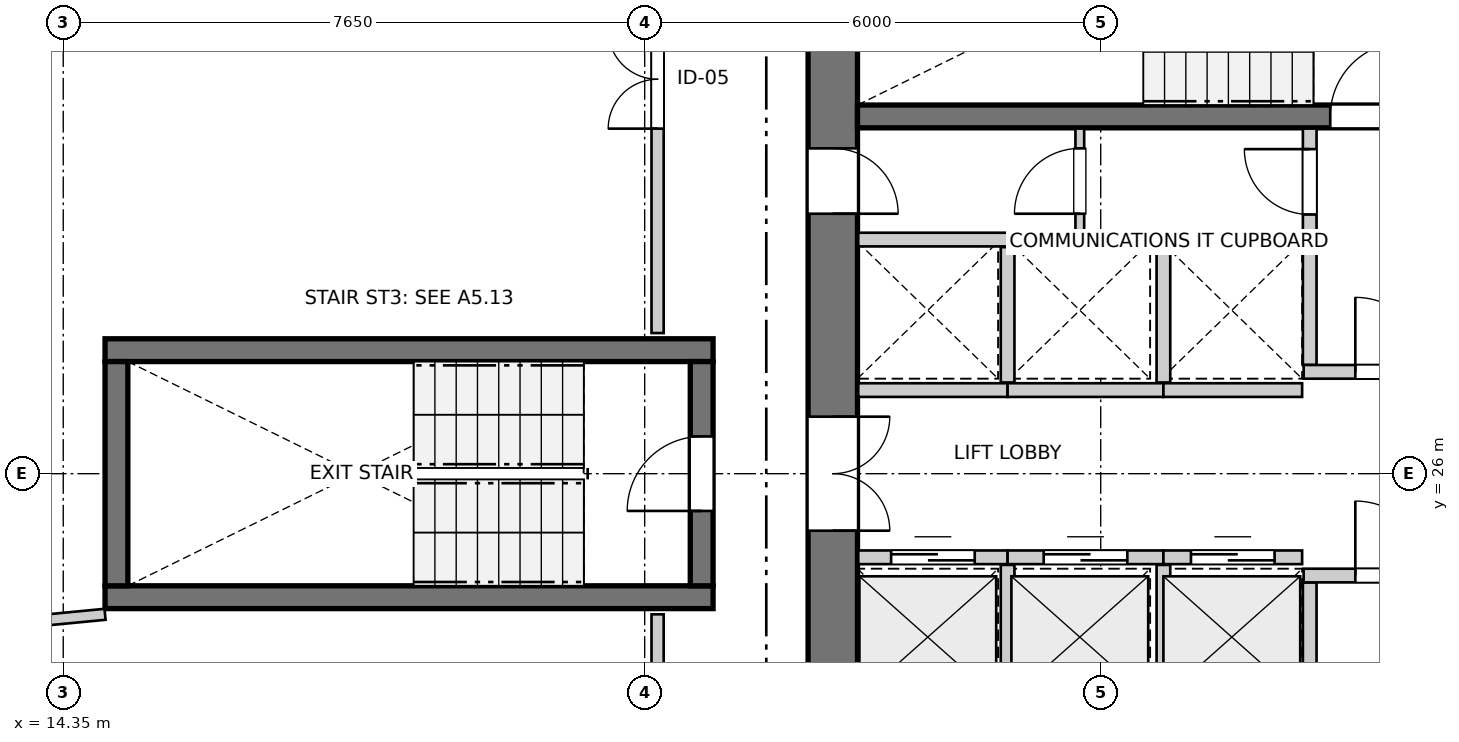
"""IFC4 building model, lengths in metres.
Left out: names, types, materials, properties, quantities, classifications, styles, units other than length and angle.
Written with IfcOpenShell. Run it as: python <this file> out.ifc"""

import sys

from ifc_helpers import new_model, si_unit, direction, frame, frame_2d, origin, place, context, subcontext, project, spatial, rectangle, extrude, source, transform, mapped, element, fill, save


model = new_model("IFC4")
c1 = context("Model", 3, precision=1e-05, world=origin(), true_north=direction((0.0, 1.0)))
c2 = subcontext(c1, "Body", "Model", "MODEL_VIEW")
j1 = project(units=[si_unit("LENGTHUNIT", "METRE"), si_unit("PLANEANGLEUNIT", "RADIAN")], contexts=[c1])
p1 = place(None, origin())
s1 = spatial("IfcSite", under=j1, at=p1, CompositionType="ELEMENT")
p2 = place(p1, origin())
s2 = spatial("IfcBuilding", under=s1, at=p2, CompositionType="ELEMENT")
p3 = place(p2, frame((0.0, 0.0, 83.2)))
s3 = spatial("IfcBuildingStorey", under=s2, at=p3, CompositionType="ELEMENT", Elevation=83.2)
p4 = place(p3, frame((24.475, 33.8, 0.0), z_axis=(0.0, 0.0, 1.0), x_axis=(0.0, -1.0, 0.0)))
e1 = element("IfcWall", 1, at=p4, inside=s3, PredefinedType="SHEAR", context=c2, shape_type="SweptSolid", body=[
    extrude(rectangle(XDim=15.6, YDim=0.65, at=frame_2d((7.8, 0.0))), origin(), (0.0, 0.0, 1.0), 2.935),
])
p5 = place(p4, frame((7.05, 0.0, 0.0)))
e2 = element("IfcOpeningElement", 2, at=p5, cuts=e1, PredefinedType="OPENING", context=c2, shape_type="SweptSolid", body=[
    extrude(rectangle(XDim=1.5, YDim=2.15, at=frame_2d((0.75, 1.075))), frame((0.0, 0.335, 0.0), z_axis=(0.0, -1.0, 0.0), x_axis=(1.0, 0.0, 0.0)), (0.0, 0.0, 1.0), 0.67),
])
p6 = place(p4, frame((3.52, 0.0, 0.0)))
e3 = element("IfcOpeningElement", 3, at=p6, cuts=e1, PredefinedType="OPENING", context=c2, shape_type="SweptSolid", body=[
    extrude(rectangle(XDim=0.86, YDim=2.05, at=frame_2d((0.43, 1.025))), frame((0.0, 0.335, 0.0), z_axis=(0.0, -1.0, 0.0), x_axis=(1.0, 0.0, 0.0)), (0.0, 0.0, 1.0), 0.67),
])
p7 = place(p4, frame((11.22, 0.0, 0.0)))
e4 = element("IfcOpeningElement", 4, at=p7, cuts=e1, PredefinedType="OPENING", context=c2, shape_type="SweptSolid", body=[
    extrude(rectangle(XDim=0.86, YDim=2.05, at=frame_2d((0.43, 1.025))), frame((0.0, 0.335, 0.0), z_axis=(0.0, -1.0, 0.0), x_axis=(1.0, 0.0, 0.0)), (0.0, 0.0, 1.0), 0.67),
])
p8 = place(p3, frame((24.8, 30.7, 0.0), z_axis=(0.0, 0.0, 1.0), x_axis=(1.0, 0.0, 0.0)))
e5 = element("IfcWall", 5, at=p8, inside=s3, PredefinedType="SHEAR", context=c2, shape_type="SweptSolid", body=[
    extrude(rectangle(XDim=11.1, YDim=0.3, at=frame_2d((5.55, 0.0))), origin(), (0.0, 0.0, 1.0), 2.935),
])
p9 = place(p8, frame((6.22, 0.0, 0.0)))
e6 = element("IfcOpeningElement", 6, at=p9, cuts=e5, PredefinedType="OPENING", context=c2, shape_type="SweptSolid", body=[
    extrude(rectangle(XDim=0.98, YDim=2.15, at=frame_2d((0.49, 1.075))), frame((0.0, 0.16, 0.0), z_axis=(0.0, -1.0, 0.0), x_axis=(1.0, 0.0, 0.0)), (0.0, 0.0, 1.0), 0.32),
])
p10 = place(p8, frame((9.15, 0.0, 0.0)))
e7 = element("IfcOpeningElement", 7, at=p10, cuts=e5, PredefinedType="OPENING", context=c2, shape_type="SweptSolid", body=[
    extrude(rectangle(XDim=1.15, YDim=2.15, at=frame_2d((0.575, 1.075))), frame((0.0, 0.16, 0.0), z_axis=(0.0, -1.0, 0.0), x_axis=(1.0, 0.0, 0.0)), (0.0, 0.0, 1.0), 0.32),
])
for number, where, z_axis, x_axis in (
    (8, (14.9, 24.375, 0.0), (0.0, 0.0, 1.0), (1.0, 0.0, 0.0)),
    (9, (22.9, 27.625, 0.0), (0.0, 0.0, 1.0), (-1.0, 0.0, 0.0)),
):
    element("IfcWall", number, at=place(p3, frame(where, z_axis=z_axis, x_axis=x_axis)), inside=s3, PredefinedType="SHEAR", context=c2, shape_type="SweptSolid", body=[
        extrude(rectangle(XDim=8.0, YDim=0.3, at=frame_2d((4.0, 0.0))), origin(), (0.0, 0.0, 1.0), 2.935),
    ])
p11 = place(p3, frame((15.05, 27.475, 0.0), z_axis=(0.0, 0.0, 1.0), x_axis=(0.0, -1.0, 0.0)))
e10 = element("IfcWall", 10, at=p11, inside=s3, PredefinedType="SHEAR", context=c2, shape_type="SweptSolid", body=[
    extrude(rectangle(XDim=2.95, YDim=0.3, at=frame_2d((1.475, 0.0))), origin(), (0.0, 0.0, 1.0), 2.935),
])
p12 = place(p3, frame((22.75, 24.525, 0.0), z_axis=(0.0, 0.0, 1.0), x_axis=(0.0, 1.0, 0.0)))
e11 = element("IfcWall", 11, at=p12, inside=s3, PredefinedType="SHEAR", context=c2, shape_type="SweptSolid", body=[
    extrude(rectangle(XDim=2.95, YDim=0.3, at=frame_2d((1.475, 0.0))), origin(), (0.0, 0.0, 1.0), 2.935),
])
p13 = place(p12, frame((0.985, 0.0, 0.0)))
e12 = element("IfcOpeningElement", 12, at=p13, cuts=e11, PredefinedType="OPENING", context=c2, shape_type="SweptSolid", body=[
    extrude(rectangle(XDim=0.98, YDim=2.15, at=frame_2d((0.49, 1.075))), frame((0.0, 0.16, 0.0), z_axis=(0.0, -1.0, 0.0), x_axis=(1.0, 0.0, 0.0)), (0.0, 0.0, 1.0), 0.32),
])
p14 = place(p3, frame((30.75, 21.46, 0.0), z_axis=(0.0, 0.0, 1.0), x_axis=(0.0, 1.0, 0.0)))
e13 = element("IfcWall", 13, at=p14, inside=s3, PredefinedType="PARTITIONING", context=c2, shape_type="SweptSolid", body=[
    extrude(rectangle(XDim=3.11, YDim=0.18, at=frame_2d((1.555, 0.0))), origin(), (0.0, 0.0, 1.0), 2.935),
])
p15 = place(p14, frame((0.26, 0.0, 0.0)))
e14 = element("IfcOpeningElement", 14, at=p15, cuts=e13, PredefinedType="OPENING", context=c2, shape_type="SweptSolid", body=[
    extrude(rectangle(XDim=0.86, YDim=2.05, at=frame_2d((0.43, 1.025))), frame((0.0, 0.1, 0.0), z_axis=(0.0, -1.0, 0.0), x_axis=(1.0, 0.0, 0.0)), (0.0, 0.0, 1.0), 0.2),
])
p16 = place(p3, frame((30.67, 24.66, 0.0), z_axis=(0.0, 0.0, 1.0), x_axis=(1.0, 0.0, 0.0)))
e15 = element("IfcWall", 15, at=p16, inside=s3, PredefinedType="PARTITIONING", context=c2, shape_type="SweptSolid", body=[
    extrude(rectangle(XDim=5.22, YDim=0.18, at=frame_2d((2.61, 0.0))), origin(), (0.0, 0.0, 1.0), 2.935),
])
p17 = place(p16, frame((0.68, 0.0, 0.0)))
e16 = element("IfcOpeningElement", 16, at=p17, cuts=e15, PredefinedType="OPENING", context=c2, shape_type="SweptSolid", body=[
    extrude(rectangle(XDim=0.98, YDim=2.15, at=frame_2d((0.49, 1.075))), frame((0.0, 0.1, 0.0), z_axis=(0.0, -1.0, 0.0), x_axis=(1.0, 0.0, 0.0)), (0.0, 0.0, 1.0), 0.2),
])
p18 = place(p3, frame((30.75, 27.43, 0.0), z_axis=(0.0, 0.0, 1.0), x_axis=(0.0, 1.0, 0.0)))
e17 = element("IfcWall", 17, at=p18, inside=s3, PredefinedType="PARTITIONING", context=c2, shape_type="SweptSolid", body=[
    extrude(rectangle(XDim=3.11, YDim=0.18, at=frame_2d((1.555, 0.0))), origin(), (0.0, 0.0, 1.0), 2.935),
])
p19 = place(p18, frame((1.98, 0.0, 0.0)))
e18 = element("IfcOpeningElement", 18, at=p19, cuts=e17, PredefinedType="OPENING", context=c2, shape_type="SweptSolid", body=[
    extrude(rectangle(XDim=0.86, YDim=2.05, at=frame_2d((0.43, 1.025))), frame((0.0, 0.1, 0.0), z_axis=(0.0, -1.0, 0.0), x_axis=(1.0, 0.0, 0.0)), (0.0, 0.0, 1.0), 0.2),
])
p20 = place(p3, frame((30.67, 27.34, 0.0), z_axis=(0.0, 0.0, 1.0), x_axis=(1.0, 0.0, 0.0)))
e19 = element("IfcWall", 19, at=p20, inside=s3, PredefinedType="PARTITIONING", context=c2, shape_type="SweptSolid", body=[
    extrude(rectangle(XDim=5.22, YDim=0.18, at=frame_2d((2.61, 0.0))), origin(), (0.0, 0.0, 1.0), 2.935),
])
p21 = place(p20, frame((0.68, 0.0, 0.0)))
e20 = element("IfcOpeningElement", 20, at=p21, cuts=e19, PredefinedType="OPENING", context=c2, shape_type="SweptSolid", body=[
    extrude(rectangle(XDim=0.98, YDim=2.15, at=frame_2d((0.49, 1.075))), frame((0.0, 0.1, 0.0), z_axis=(0.0, -1.0, 0.0), x_axis=(1.0, 0.0, 0.0)), (0.0, 0.0, 1.0), 0.2),
])
p22 = place(p3, frame((24.81, 24.9, 0.0), z_axis=(0.0, 0.0, 1.0), x_axis=(1.0, 0.0, 0.0)))
e21 = element("IfcWall", 21, at=p22, inside=s3, PredefinedType="PARTITIONING", context=c2, shape_type="SweptSolid", body=[
    extrude(rectangle(XDim=1.965, YDim=0.18, at=frame_2d((0.982, 0.0))), origin(), (0.0, 0.0, 1.0), 2.935),
])
p23 = place(p22, frame((0.433, 0.0, 0.0)))
e22 = element("IfcOpeningElement", 22, at=p23, cuts=e21, PredefinedType="OPENING", context=c2, shape_type="SweptSolid", body=[
    extrude(rectangle(XDim=1.1, YDim=2.15, at=frame_2d((0.55, 1.075))), frame((0.0, 0.1, 0.0), z_axis=(0.0, -1.0, 0.0), x_axis=(1.0, 0.0, 0.0)), (0.0, 0.0, 1.0), 0.2),
])
p24 = place(p3, frame((26.775, 24.9, 0.0), z_axis=(0.0, 0.0, 1.0), x_axis=(1.0, 0.0, 0.0)))
e23 = element("IfcWall", 23, at=p24, inside=s3, PredefinedType="PARTITIONING", context=c2, shape_type="SweptSolid", body=[
    extrude(rectangle(XDim=2.05, YDim=0.18, at=frame_2d((1.025, 0.0))), origin(), (0.0, 0.0, 1.0), 2.935),
])
p25 = place(p24, frame((0.475, 0.0, 0.0)))
e24 = element("IfcOpeningElement", 24, at=p25, cuts=e23, PredefinedType="OPENING", context=c2, shape_type="SweptSolid", body=[
    extrude(rectangle(XDim=1.1, YDim=2.15, at=frame_2d((0.55, 1.075))), frame((0.0, 0.1, 0.0), z_axis=(0.0, -1.0, 0.0), x_axis=(1.0, 0.0, 0.0)), (0.0, 0.0, 1.0), 0.2),
])
p26 = place(p3, frame((26.775, 23.02, 0.0), z_axis=(0.0, 0.0, 1.0), x_axis=(0.0, 1.0, 0.0)))
e25 = element("IfcWall", 25, at=p26, inside=s3, PredefinedType="PARTITIONING", context=c2, shape_type="SweptSolid", body=[
    extrude(rectangle(XDim=1.78, YDim=0.18, at=frame_2d((0.89, 0.0))), origin(), (0.0, 0.0, 1.0), 2.935),
])
p27 = place(p3, frame((28.825, 24.9, 0.0), z_axis=(0.0, 0.0, 1.0), x_axis=(1.0, 0.0, 0.0)))
e26 = element("IfcWall", 26, at=p27, inside=s3, PredefinedType="PARTITIONING", context=c2, shape_type="SweptSolid", body=[
    extrude(rectangle(XDim=1.825, YDim=0.18, at=frame_2d((0.913, 0.0))), origin(), (0.0, 0.0, 1.0), 2.935),
])
p28 = place(p27, frame((0.363, 0.0, 0.0)))
e27 = element("IfcOpeningElement", 27, at=p28, cuts=e26, PredefinedType="OPENING", context=c2, shape_type="SweptSolid", body=[
    extrude(rectangle(XDim=1.1, YDim=2.15, at=frame_2d((0.55, 1.075))), frame((0.0, 0.1, 0.0), z_axis=(0.0, -1.0, 0.0), x_axis=(1.0, 0.0, 0.0)), (0.0, 0.0, 1.0), 0.2),
])
p29 = place(p3, frame((28.825, 23.02, 0.0), z_axis=(0.0, 0.0, 1.0), x_axis=(0.0, 1.0, 0.0)))
e28 = element("IfcWall", 28, at=p29, inside=s3, PredefinedType="PARTITIONING", context=c2, shape_type="SweptSolid", body=[
    extrude(rectangle(XDim=1.78, YDim=0.18, at=frame_2d((0.89, 0.0))), origin(), (0.0, 0.0, 1.0), 2.935),
])
p30 = place(p3, frame((24.81, 29.08, 0.0), z_axis=(0.0, 0.0, 1.0), x_axis=(1.0, 0.0, 0.0)))
e29 = element("IfcWall", 29, at=p30, inside=s3, PredefinedType="PARTITIONING", context=c2, shape_type="SweptSolid", body=[
    extrude(rectangle(XDim=5.84, YDim=0.18, at=frame_2d((2.92, 0.0))), origin(), (0.0, 0.0, 1.0), 2.935),
])
p31 = place(p3, frame((24.81, 27.1, 0.0), z_axis=(0.0, 0.0, 1.0), x_axis=(1.0, 0.0, 0.0)))
e30 = element("IfcWall", 30, at=p31, inside=s3, PredefinedType="PARTITIONING", context=c2, shape_type="SweptSolid", body=[
    extrude(rectangle(XDim=1.965, YDim=0.18, at=frame_2d((0.982, 0.0))), origin(), (0.0, 0.0, 1.0), 2.935),
])
p32 = place(p3, frame((26.775, 27.1, 0.0), z_axis=(0.0, 0.0, 1.0), x_axis=(1.0, 0.0, 0.0)))
e31 = element("IfcWall", 31, at=p32, inside=s3, PredefinedType="PARTITIONING", context=c2, shape_type="SweptSolid", body=[
    extrude(rectangle(XDim=2.05, YDim=0.18, at=frame_2d((1.025, 0.0))), origin(), (0.0, 0.0, 1.0), 2.935),
])
p33 = place(p3, frame((26.775, 27.2, 0.0), z_axis=(0.0, 0.0, 1.0), x_axis=(0.0, 1.0, 0.0)))
e32 = element("IfcWall", 32, at=p33, inside=s3, PredefinedType="PARTITIONING", context=c2, shape_type="SweptSolid", body=[
    extrude(rectangle(XDim=1.78, YDim=0.18, at=frame_2d((0.89, 0.0))), origin(), (0.0, 0.0, 1.0), 2.935),
])
p34 = place(p3, frame((28.825, 27.1, 0.0), z_axis=(0.0, 0.0, 1.0), x_axis=(1.0, 0.0, 0.0)))
e33 = element("IfcWall", 33, at=p34, inside=s3, PredefinedType="PARTITIONING", context=c2, shape_type="SweptSolid", body=[
    extrude(rectangle(XDim=1.825, YDim=0.18, at=frame_2d((0.913, 0.0))), origin(), (0.0, 0.0, 1.0), 2.935),
])
p35 = place(p3, frame((28.825, 27.2, 0.0), z_axis=(0.0, 0.0, 1.0), x_axis=(0.0, 1.0, 0.0)))
e34 = element("IfcWall", 34, at=p35, inside=s3, PredefinedType="PARTITIONING", context=c2, shape_type="SweptSolid", body=[
    extrude(rectangle(XDim=1.78, YDim=0.18, at=frame_2d((0.89, 0.0))), origin(), (0.0, 0.0, 1.0), 2.935),
])
p36 = place(p3, frame((27.725, 29.16, 0.0), z_axis=(0.0, 0.0, 1.0), x_axis=(0.0, 1.0, 0.0)))
e35 = element("IfcWall", 35, at=p36, inside=s3, PredefinedType="PARTITIONING", context=c2, shape_type="SweptSolid", body=[
    extrude(rectangle(XDim=1.38, YDim=0.115, at=frame_2d((0.69, 0.0))), origin(), (0.0, 0.0, 1.0), 2.935),
])
p37 = place(p36, frame((0.26, 0.0, 0.0)))
e36 = element("IfcOpeningElement", 36, at=p37, cuts=e35, PredefinedType="OPENING", context=c2, shape_type="SweptSolid", body=[
    extrude(rectangle(XDim=0.86, YDim=2.05, at=frame_2d((0.43, 1.025))), frame((0.0, 0.067, 0.0), z_axis=(0.0, -1.0, 0.0), x_axis=(1.0, 0.0, 0.0)), (0.0, 0.0, 1.0), 0.135),
])
p38 = place(p3, frame((22.17, 27.85, 0.0), z_axis=(0.0, 0.0, 1.0), x_axis=(0.0, 1.0, 0.0)))
e37 = element("IfcWall", 37, at=p38, inside=s3, PredefinedType="PARTITIONING", context=c2, shape_type="SweptSolid", body=[
    extrude(rectangle(XDim=5.276, YDim=0.16, at=frame_2d((2.638, 0.0))), origin(), (0.0, 0.0, 1.0), 2.935),
])
p39 = place(p38, frame((2.689, 0.0, 0.0)))
e38 = element("IfcOpeningElement", 38, at=p39, cuts=e37, PredefinedType="OPENING", context=c2, shape_type="SweptSolid", body=[
    extrude(rectangle(XDim=1.3, YDim=2.1, at=frame_2d((0.65, 1.05))), frame((0.0, 0.09, 0.0), z_axis=(0.0, -1.0, 0.0), x_axis=(1.0, 0.0, 0.0)), (0.0, 0.0, 1.0), 0.18),
])
p40 = place(p3, frame((22.17, 21.128, 0.0), z_axis=(0.0, 0.0, 1.0), x_axis=(0.0, 1.0, 0.0)))
e39 = element("IfcWall", 39, at=p40, inside=s3, PredefinedType="PARTITIONING", context=c2, shape_type="SweptSolid", body=[
    extrude(rectangle(XDim=3.022, YDim=0.16, at=frame_2d((1.511, 0.0))), origin(), (0.0, 0.0, 1.0), 2.935),
])
p41 = place(p40, frame((0.883, 0.0, 0.0)))
e40 = element("IfcOpeningElement", 40, at=p41, cuts=e39, PredefinedType="OPENING", context=c2, shape_type="SweptSolid", body=[
    extrude(rectangle(XDim=1.3, YDim=2.1, at=frame_2d((0.65, 1.05))), frame((0.0, 0.09, 0.0), z_axis=(0.0, -1.0, 0.0), x_axis=(1.0, 0.0, 0.0)), (0.0, 0.0, 1.0), 0.18),
])
p42 = place(p3, frame((6.605, 23.351, 0.0), z_axis=(0.0, 0.0, 1.0), x_axis=(0.995388985265, 0.09592063393, 0.0)))
e41 = element("IfcWall", 41, at=p42, inside=s3, PredefinedType="PARTITIONING", context=c2, shape_type="SweptSolid", body=[
    extrude(rectangle(XDim=8.333, YDim=0.145, at=frame_2d((4.167, 0.0))), origin(), (0.0, 0.0, 1.0), 2.935),
])
m1 = source(origin(), c2, "Body", "SweptSolid", [
    extrude(rectangle(XDim=0.98, YDim=2.15, at=frame_2d((0.49, 1.075))), frame((0.0, 0.025, 0.0), z_axis=(0.0, -1.0, 0.0), x_axis=(1.0, 0.0, 0.0)), (0.0, 0.0, 1.0), 0.05),
])
p43 = place(p9, origin())
e42 = element("IfcDoor", 42, at=p43, inside=s3, OperationType="SINGLE_SWING_RIGHT", PredefinedType="DOOR", context=c2, shape_type="MappedRepresentation", body=[
    mapped(m1, transform((0.0, 0.0, 0.0), x_axis=(1.0, 0.0, 0.0), y_axis=(0.0, 1.0, 0.0), z_axis=(0.0, 0.0, 1.0), scale=1.0)),
])
fill(e6, e42)
p44 = place(p13, origin())
e43 = element("IfcDoor", 43, at=p44, inside=s3, OperationType="SINGLE_SWING_LEFT", PredefinedType="DOOR", context=c2, shape_type="MappedRepresentation", body=[
    mapped(m1, transform((0.0, 0.0, 0.0), x_axis=(1.0, 0.0, 0.0), y_axis=(0.0, 1.0, 0.0), z_axis=(0.0, 0.0, 1.0), scale=1.0)),
])
fill(e12, e43)
m2 = source(origin(), c2, "Body", "SweptSolid", [
    extrude(rectangle(XDim=1.5, YDim=2.15, at=frame_2d((0.75, 1.075))), frame((0.0, 0.025, 0.0), z_axis=(0.0, -1.0, 0.0), x_axis=(1.0, 0.0, 0.0)), (0.0, 0.0, 1.0), 0.05),
])
p45 = place(p5, origin())
e44 = element("IfcDoor", 44, at=p45, inside=s3, OperationType="DOUBLE_DOOR_SINGLE_SWING", PredefinedType="DOOR", context=c2, shape_type="MappedRepresentation", body=[
    mapped(m2, transform((0.0, 0.0, 0.0), x_axis=(1.0, 0.0, 0.0), y_axis=(0.0, 1.0, 0.0), z_axis=(0.0, 0.0, 1.0), scale=1.0)),
])
fill(e2, e44)
m3 = source(origin(), c2, "Body", "SweptSolid", [
    extrude(rectangle(XDim=0.86, YDim=2.05, at=frame_2d((0.43, 1.025))), frame((0.0, 0.025, 0.0), z_axis=(0.0, -1.0, 0.0), x_axis=(1.0, 0.0, 0.0)), (0.0, 0.0, 1.0), 0.05),
])
p46 = place(p6, origin())
e45 = element("IfcDoor", 45, at=p46, inside=s3, OperationType="SINGLE_SWING_RIGHT", PredefinedType="DOOR", context=c2, shape_type="MappedRepresentation", body=[
    mapped(m3, transform((0.0, 0.0, 0.0), x_axis=(1.0, 0.0, 0.0), y_axis=(0.0, 1.0, 0.0), z_axis=(0.0, 0.0, 1.0), scale=1.0)),
])
fill(e3, e45)
p47 = place(p17, origin())
e46 = element("IfcDoor", 46, at=p47, inside=s3, OperationType="SINGLE_SWING_LEFT", PredefinedType="DOOR", context=c2, shape_type="MappedRepresentation", body=[
    mapped(m1, transform((0.0, 0.0, 0.0), x_axis=(1.0, 0.0, 0.0), y_axis=(0.0, 1.0, 0.0), z_axis=(0.0, 0.0, 1.0), scale=1.0)),
])
fill(e16, e46)
p48 = place(p19, origin())
e47 = element("IfcDoor", 47, at=p48, inside=s3, OperationType="SINGLE_SWING_RIGHT", PredefinedType="DOOR", context=c2, shape_type="MappedRepresentation", body=[
    mapped(m3, transform((0.0, 0.0, 0.0), x_axis=(1.0, 0.0, 0.0), y_axis=(0.0, 1.0, 0.0), z_axis=(0.0, 0.0, 1.0), scale=1.0)),
])
fill(e18, e47)
p49 = place(p21, origin())
e48 = element("IfcDoor", 48, at=p49, inside=s3, OperationType="SINGLE_SWING_LEFT", PredefinedType="DOOR", context=c2, shape_type="MappedRepresentation", body=[
    mapped(m1, transform((0.0, 0.0, 0.0), x_axis=(1.0, 0.0, 0.0), y_axis=(0.0, 1.0, 0.0), z_axis=(0.0, 0.0, 1.0), scale=1.0)),
])
fill(e20, e48)
m4 = source(origin(), c2, "Body", "SweptSolid", [
    extrude(rectangle(XDim=1.1, YDim=2.15, at=frame_2d((0.55, 1.075))), frame((0.0, 0.025, 0.0), z_axis=(0.0, -1.0, 0.0), x_axis=(1.0, 0.0, 0.0)), (0.0, 0.0, 1.0), 0.05),
])
p50 = place(p23, origin())
e49 = element("IfcDoor", 49, at=p50, inside=s3, OperationType="DOUBLE_DOOR_SLIDING", PredefinedType="DOOR", context=c2, shape_type="MappedRepresentation", body=[
    mapped(m4, transform((0.0, 0.0, 0.0), x_axis=(1.0, 0.0, 0.0), y_axis=(0.0, 1.0, 0.0), z_axis=(0.0, 0.0, 1.0), scale=1.0)),
])
fill(e22, e49)
p51 = place(p25, origin())
e50 = element("IfcDoor", 50, at=p51, inside=s3, OperationType="DOUBLE_DOOR_SLIDING", PredefinedType="DOOR", context=c2, shape_type="MappedRepresentation", body=[
    mapped(m4, transform((0.0, 0.0, 0.0), x_axis=(1.0, 0.0, 0.0), y_axis=(0.0, 1.0, 0.0), z_axis=(0.0, 0.0, 1.0), scale=1.0)),
])
fill(e24, e50)
p52 = place(p28, origin())
e51 = element("IfcDoor", 51, at=p52, inside=s3, OperationType="DOUBLE_DOOR_SLIDING", PredefinedType="DOOR", context=c2, shape_type="MappedRepresentation", body=[
    mapped(m4, transform((0.0, 0.0, 0.0), x_axis=(1.0, 0.0, 0.0), y_axis=(0.0, 1.0, 0.0), z_axis=(0.0, 0.0, 1.0), scale=1.0)),
])
fill(e27, e51)
p53 = place(p37, origin())
e52 = element("IfcDoor", 52, at=p53, inside=s3, OperationType="SINGLE_SWING_LEFT", PredefinedType="DOOR", context=c2, shape_type="MappedRepresentation", body=[
    mapped(m3, transform((0.0, 0.0, 0.0), x_axis=(1.0, 0.0, 0.0), y_axis=(0.0, 1.0, 0.0), z_axis=(0.0, 0.0, 1.0), scale=1.0)),
])
fill(e36, e52)
m5 = source(origin(), c2, "Body", "SweptSolid", [
    extrude(rectangle(XDim=1.3, YDim=2.1, at=frame_2d((0.65, 1.05))), frame((0.0, 0.025, 0.0), z_axis=(0.0, -1.0, 0.0), x_axis=(1.0, 0.0, 0.0)), (0.0, 0.0, 1.0), 0.05),
])
p54 = place(p39, origin())
e53 = element("IfcDoor", 53, at=p54, inside=s3, OperationType="DOUBLE_DOOR_SINGLE_SWING", PredefinedType="DOOR", context=c2, shape_type="MappedRepresentation", body=[
    mapped(m5, transform((0.0, 0.0, 0.0), x_axis=(1.0, 0.0, 0.0), y_axis=(0.0, 1.0, 0.0), z_axis=(0.0, 0.0, 1.0), scale=1.0)),
])
fill(e38, e53)
save(model, sys.argv[1])
